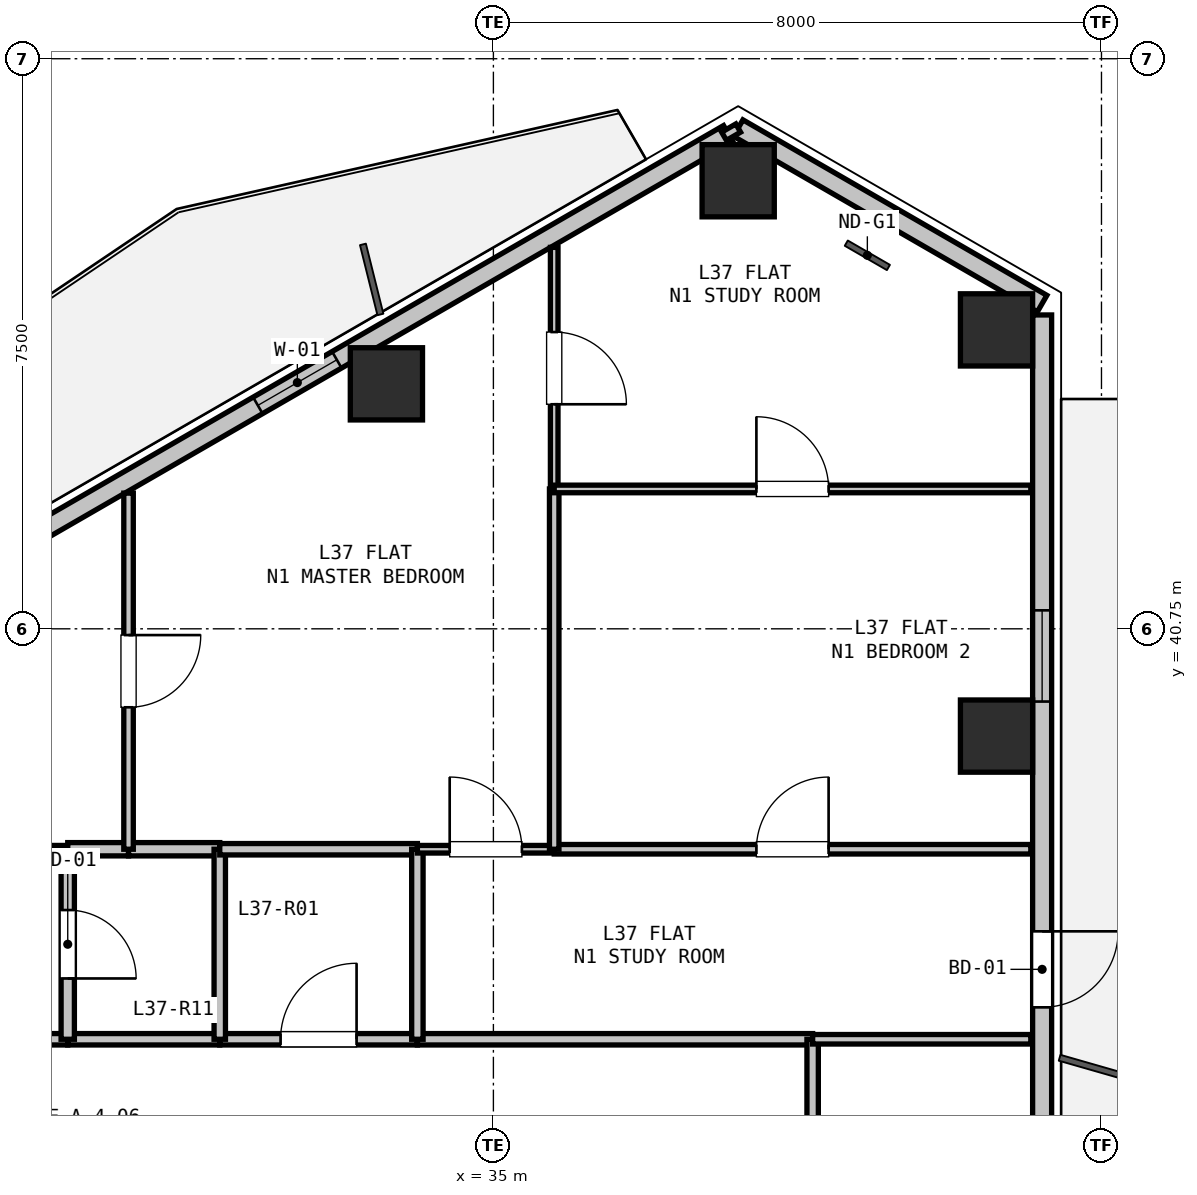
"""IFC4 building model, lengths in metres.
Left out: names, types, materials, properties, quantities, classifications, styles, units other than length and angle.
Written with IfcOpenShell. Run it as: python <this file> out.ifc"""

import sys

from ifc_helpers import new_model, si_unit, direction, frame, frame_2d, origin, origin_2d, place, context, subcontext, project, spatial, rectangle, hollow_rectangle, extrude, element, fill, save


model = new_model("IFC4")
c1 = context("Model", 3, precision=1e-05, world=origin(), true_north=direction((0.0, 1.0)))
c2 = subcontext(c1, "Body", "Model", "MODEL_VIEW")
j1 = project(units=[si_unit("LENGTHUNIT", "METRE"), si_unit("PLANEANGLEUNIT", "RADIAN")], contexts=[c1])
p1 = place(None, origin())
s1 = spatial("IfcSite", under=j1, at=p1, CompositionType="ELEMENT")
p2 = place(p1, origin())
s2 = spatial("IfcBuilding", under=s1, at=p2, CompositionType="ELEMENT")
p3 = place(p2, frame((0.0, 0.0, 134.4)))
s3 = spatial("IfcBuildingStorey", under=s2, at=p3, CompositionType="ELEMENT", Elevation=134.4)
for number, where, z_axis, x_axis in (
    (1, (33.593, 43.973, 0.0), (0.0, 0.0, 1.0), (1.0, 0.0, 0.0)),
    (2, (38.22, 46.645, 0.0), (0.0, 0.0, 1.0), (1.0, 0.0, 0.0)),
    (3, (41.619, 44.683, 0.0), (0.0, 0.0, 1.0), (1.0, 0.0, 0.0)),
    (4, (41.619, 39.339, 0.0), (0.0, 0.0, 1.0), (1.0, 0.0, 0.0)),
):
    element("IfcColumn", number, at=place(p3, frame(where, z_axis=z_axis, x_axis=x_axis)), inside=s3, PredefinedType="COLUMN", context=c2, shape_type="SweptSolid", body=[
        extrude(hollow_rectangle(XDim=0.95, YDim=0.95, WallThickness=0.028, at=origin_2d()), origin(), (0.0, 0.0, 1.0), 3.3),
    ])
p4 = place(p3, frame((38.22, 47.338, 0.0), z_axis=(0.0, 0.0, 1.0), x_axis=(0.866035021055, -0.499983342029, 0.0)))
e5 = element("IfcWall", 5, at=p4, inside=s3, PredefinedType="SOLIDWALL", context=c2, shape_type="SweptSolid", body=[
    extrude(rectangle(XDim=4.617, YDim=0.25, at=frame_2d((2.309, 0.0))), origin(), (0.0, 0.0, 1.0), 2.68),
])
p5 = place(p3, frame((28.403, 41.67, 0.0), z_axis=(0.0, 0.0, 1.0), x_axis=(0.86602239209, 0.500005216371, 0.0)))
e6 = element("IfcWall", 6, at=p5, inside=s3, PredefinedType="SOLIDWALL", context=c2, shape_type="SweptSolid", body=[
    extrude(rectangle(XDim=11.186, YDim=0.25, at=frame_2d((5.593, 0.0))), origin(), (0.0, 0.0, 1.0), 2.68),
])
p6 = place(p5, frame((4.039, 0.0, 0.9)))
e7 = element("IfcOpeningElement", 7, at=p6, cuts=e6, PredefinedType="OPENING", context=c2, shape_type="SweptSolid", body=[
    extrude(rectangle(XDim=1.2, YDim=1.4, at=frame_2d((0.6, 0.7))), frame((0.0, 0.135, 0.0), z_axis=(0.0, -1.0, 0.0), x_axis=(1.0, 0.0, 0.0)), (0.0, 0.0, 1.0), 0.27),
])
p7 = place(p3, frame((42.219, 44.879, 0.0), z_axis=(0.0, 0.0, 1.0), x_axis=(0.0, -1.0, 0.0)))
e8 = element("IfcWall", 8, at=p7, inside=s3, PredefinedType="SOLIDWALL", context=c2, shape_type="SweptSolid", body=[
    extrude(rectangle(XDim=11.186, YDim=0.25, at=frame_2d((5.593, 0.0))), origin(), (0.0, 0.0, 1.0), 2.68),
])
p8 = place(p7, frame((8.109, 0.0, 0.0)))
e9 = element("IfcOpeningElement", 9, at=p8, cuts=e8, PredefinedType="OPENING", context=c2, shape_type="SweptSolid", body=[
    extrude(rectangle(XDim=1.0, YDim=2.1, at=frame_2d((0.5, 1.05))), frame((0.0, 0.135, 0.0), z_axis=(0.0, -1.0, 0.0), x_axis=(1.0, 0.0, 0.0)), (0.0, 0.0, 1.0), 0.27),
])
p9 = place(p7, frame((3.886, 0.0, 0.9)))
e10 = element("IfcOpeningElement", 10, at=p9, cuts=e8, PredefinedType="OPENING", context=c2, shape_type="SweptSolid", body=[
    extrude(rectangle(XDim=1.2, YDim=1.4, at=frame_2d((0.6, 0.7))), frame((0.0, 0.135, 0.0), z_axis=(0.0, -1.0, 0.0), x_axis=(1.0, 0.0, 0.0)), (0.0, 0.0, 1.0), 0.27),
])
p10 = place(p3, frame((26.8, 35.35, 0.0), z_axis=(0.0, 0.0, 1.0), x_axis=(1.0, 0.0, 0.0)))
e11 = element("IfcWall", 11, at=p10, inside=s3, PredefinedType="PARTITIONING", context=c2, shape_type="SweptSolid", body=[
    extrude(rectangle(XDim=2.6, YDim=0.15, at=frame_2d((1.3, 0.0))), origin(), (0.0, 0.0, 1.0), 3.06),
])
p11 = place(p10, frame((0.8, 0.0, 0.0)))
e12 = element("IfcOpeningElement", 12, at=p11, cuts=e11, PredefinedType="OPENING", context=c2, shape_type="SweptSolid", body=[
    extrude(rectangle(XDim=1.0, YDim=2.15, at=frame_2d((0.5, 1.075))), frame((0.0, 0.085, 0.0), z_axis=(0.0, -1.0, 0.0), x_axis=(1.0, 0.0, 0.0)), (0.0, 0.0, 1.0), 0.17),
])
p12 = place(p3, frame((29.4, 35.35, 0.0), z_axis=(0.0, 0.0, 1.0), x_axis=(1.0, 0.0, 0.0)))
e13 = element("IfcWall", 13, at=p12, inside=s3, PredefinedType="PARTITIONING", context=c2, shape_type="SweptSolid", body=[
    extrude(rectangle(XDim=2.0, YDim=0.15, at=frame_2d((1.0, 0.0))), origin(), (0.0, 0.0, 1.0), 3.06),
])
p13 = place(p3, frame((31.4, 35.35, 0.0), z_axis=(0.0, 0.0, 1.0), x_axis=(1.0, 0.0, 0.0)))
e14 = element("IfcWall", 14, at=p13, inside=s3, PredefinedType="PARTITIONING", context=c2, shape_type="SweptSolid", body=[
    extrude(rectangle(XDim=2.6, YDim=0.15, at=frame_2d((1.3, 0.0))), origin(), (0.0, 0.0, 1.0), 3.06),
])
p14 = place(p13, frame((0.8, 0.0, 0.0)))
e15 = element("IfcOpeningElement", 15, at=p14, cuts=e14, PredefinedType="OPENING", context=c2, shape_type="SweptSolid", body=[
    extrude(rectangle(XDim=1.0, YDim=2.15, at=frame_2d((0.5, 1.075))), frame((0.0, 0.085, 0.0), z_axis=(0.0, -1.0, 0.0), x_axis=(1.0, 0.0, 0.0)), (0.0, 0.0, 1.0), 0.17),
])
p15 = place(p3, frame((34.0, 35.35, 0.0), z_axis=(0.0, 0.0, 1.0), x_axis=(1.0, 0.0, 0.0)))
e16 = element("IfcWall", 16, at=p15, inside=s3, PredefinedType="PARTITIONING", context=c2, shape_type="SweptSolid", body=[
    extrude(rectangle(XDim=5.2, YDim=0.15, at=frame_2d((2.6, 0.0))), origin(), (0.0, 0.0, 1.0), 2.433),
])
p16 = place(p3, frame((39.2, 35.35, 0.0), z_axis=(0.0, 0.0, 1.0), x_axis=(0.0, -1.0, 0.0)))
e17 = element("IfcWall", 17, at=p16, inside=s3, PredefinedType="PARTITIONING", context=c2, shape_type="SweptSolid", body=[
    extrude(rectangle(XDim=1.75, YDim=0.15, at=frame_2d((0.875, 0.0))), origin(), (0.0, 0.0, 1.0), 3.06),
])
p17 = place(p3, frame((26.8, 37.85, 0.0), z_axis=(0.0, 0.0, 1.0), x_axis=(1.0, 0.0, 0.0)))
e18 = element("IfcWall", 18, at=p17, inside=s3, PredefinedType="PARTITIONING", context=c2, shape_type="SweptSolid", body=[
    extrude(rectangle(XDim=2.6, YDim=0.1, at=frame_2d((1.3, 0.0))), origin(), (0.0, 0.0, 1.0), 3.06),
])
p18 = place(p17, frame((0.825, 0.0, 0.0)))
e19 = element("IfcOpeningElement", 19, at=p18, cuts=e18, PredefinedType="OPENING", context=c2, shape_type="SweptSolid", body=[
    extrude(rectangle(XDim=0.95, YDim=2.1, at=frame_2d((0.475, 1.05))), frame((0.0, 0.06, 0.0), z_axis=(0.0, -1.0, 0.0), x_axis=(1.0, 0.0, 0.0)), (0.0, 0.0, 1.0), 0.12),
])
p19 = place(p3, frame((29.4, 37.85, 0.0), z_axis=(0.0, 0.0, 1.0), x_axis=(0.0, -1.0, 0.0)))
e20 = element("IfcWall", 20, at=p19, inside=s3, PredefinedType="PLUMBINGWALL", context=c2, shape_type="SweptSolid", body=[
    extrude(rectangle(XDim=2.5, YDim=0.175, at=frame_2d((1.25, 0.0))), origin(), (0.0, 0.0, 1.0), 3.06),
])
p20 = place(p19, frame((0.8, 0.0, 0.0)))
e21 = element("IfcOpeningElement", 21, at=p20, cuts=e20, PredefinedType="OPENING", context=c2, shape_type="SweptSolid", body=[
    extrude(rectangle(XDim=0.9, YDim=2.1, at=frame_2d((0.45, 1.05))), frame((0.0, 0.097, 0.0), z_axis=(0.0, -1.0, 0.0), x_axis=(1.0, 0.0, 0.0)), (0.0, 0.0, 1.0), 0.195),
])
p21 = place(p3, frame((29.4, 37.85, 0.0), z_axis=(0.0, 0.0, 1.0), x_axis=(1.0, 0.0, 0.0)))
e22 = element("IfcWall", 22, at=p21, inside=s3, PredefinedType="PLUMBINGWALL", context=c2, shape_type="SweptSolid", body=[
    extrude(rectangle(XDim=0.8, YDim=0.175, at=frame_2d((0.4, 0.0))), origin(), (0.0, 0.0, 1.0), 3.06),
])
p22 = place(p3, frame((30.2, 37.85, 0.0), z_axis=(0.0, 0.0, 1.0), x_axis=(1.0, 0.0, 0.0)))
e23 = element("IfcWall", 23, at=p22, inside=s3, PredefinedType="PLUMBINGWALL", context=c2, shape_type="SweptSolid", body=[
    extrude(rectangle(XDim=1.2, YDim=0.175, at=frame_2d((0.6, 0.0))), origin(), (0.0, 0.0, 1.0), 3.06),
])
p23 = place(p3, frame((31.4, 37.85, 0.0), z_axis=(0.0, 0.0, 1.0), x_axis=(0.0, -1.0, 0.0)))
e24 = element("IfcWall", 24, at=p23, inside=s3, PredefinedType="PARTITIONING", context=c2, shape_type="SweptSolid", body=[
    extrude(rectangle(XDim=2.5, YDim=0.15, at=frame_2d((1.25, 0.0))), origin(), (0.0, 0.0, 1.0), 3.06),
])
p24 = place(p3, frame((31.4, 37.85, 0.0), z_axis=(0.0, 0.0, 1.0), x_axis=(1.0, 0.0, 0.0)))
e25 = element("IfcWall", 25, at=p24, inside=s3, PredefinedType="PARTITIONING", context=c2, shape_type="SweptSolid", body=[
    extrude(rectangle(XDim=2.6, YDim=0.15, at=frame_2d((1.3, 0.0))), origin(), (0.0, 0.0, 1.0), 3.06),
])
p25 = place(p3, frame((34.0, 37.85, 0.0), z_axis=(0.0, 0.0, 1.0), x_axis=(0.0, -1.0, 0.0)))
e26 = element("IfcWall", 26, at=p25, inside=s3, PredefinedType="PARTITIONING", context=c2, shape_type="SweptSolid", body=[
    extrude(rectangle(XDim=2.5, YDim=0.15, at=frame_2d((1.25, 0.0))), origin(), (0.0, 0.0, 1.0), 3.06),
])
p26 = place(p3, frame((42.07, 35.35, 0.0), z_axis=(0.0, 0.0, 1.0), x_axis=(-1.0, 0.0, 0.0)))
e27 = element("IfcWall", 27, at=p26, inside=s3, PredefinedType="PARTITIONING", context=c2, shape_type="SweptSolid", body=[
    extrude(rectangle(XDim=2.87, YDim=0.125, at=frame_2d((1.435, 0.0))), origin(), (0.0, 0.0, 1.0), 2.365),
])
p27 = place(p3, frame((34.0, 37.85, 0.0), z_axis=(0.0, 0.0, 1.0), x_axis=(1.0, 0.0, 0.0)))
e28 = element("IfcWall", 28, at=p27, inside=s3, PredefinedType="PARTITIONING", context=c2, shape_type="SweptSolid", body=[
    extrude(rectangle(XDim=1.8, YDim=0.1, at=frame_2d((0.9, 0.0))), origin(), (0.0, 0.0, 1.0), 3.06),
])
p28 = place(p27, frame((0.425, 0.0, 0.0)))
e29 = element("IfcOpeningElement", 29, at=p28, cuts=e28, PredefinedType="OPENING", context=c2, shape_type="SweptSolid", body=[
    extrude(rectangle(XDim=0.95, YDim=2.1, at=frame_2d((0.475, 1.05))), frame((0.0, 0.06, 0.0), z_axis=(0.0, -1.0, 0.0), x_axis=(1.0, 0.0, 0.0)), (0.0, 0.0, 1.0), 0.12),
])
p29 = place(p3, frame((35.8, 37.85, 0.0), z_axis=(0.0, 0.0, 1.0), x_axis=(1.0, 0.0, 0.0)))
e30 = element("IfcWall", 30, at=p29, inside=s3, PredefinedType="PARTITIONING", context=c2, shape_type="SweptSolid", body=[
    extrude(rectangle(XDim=6.27, YDim=0.125, at=frame_2d((3.135, 0.0))), origin(), (0.0, 0.0, 1.0), 2.365),
])
p30 = place(p29, frame((2.66, 0.0, 0.0)))
e31 = element("IfcOpeningElement", 31, at=p30, cuts=e30, PredefinedType="OPENING", context=c2, shape_type="SweptSolid", body=[
    extrude(rectangle(XDim=0.95, YDim=2.1, at=frame_2d((0.475, 1.05))), frame((0.0, 0.073, 0.0), z_axis=(0.0, -1.0, 0.0), x_axis=(1.0, 0.0, 0.0)), (0.0, 0.0, 1.0), 0.145),
])
p31 = place(p3, frame((30.2, 42.535, 0.0), z_axis=(0.0, 0.0, 1.0), x_axis=(0.0, -1.0, 0.0)))
e32 = element("IfcWall", 32, at=p31, inside=s3, PredefinedType="PARTITIONING", context=c2, shape_type="SweptSolid", body=[
    extrude(rectangle(XDim=4.685, YDim=0.125, at=frame_2d((2.342, 0.0))), origin(), (0.0, 0.0, 1.0), 2.365),
])
p32 = place(p31, frame((1.867, 0.0, 0.0)))
e33 = element("IfcOpeningElement", 33, at=p32, cuts=e32, PredefinedType="OPENING", context=c2, shape_type="SweptSolid", body=[
    extrude(rectangle(XDim=0.95, YDim=2.1, at=frame_2d((0.475, 1.05))), frame((0.0, 0.073, 0.0), z_axis=(0.0, -1.0, 0.0), x_axis=(1.0, 0.0, 0.0)), (0.0, 0.0, 1.0), 0.145),
])
p33 = place(p3, frame((35.8, 45.768, 0.0), z_axis=(0.0, 0.0, 1.0), x_axis=(0.0, -1.0, 0.0)))
e34 = element("IfcWall", 34, at=p33, inside=s3, PredefinedType="PARTITIONING", context=c2, shape_type="SweptSolid", body=[
    extrude(rectangle(XDim=3.178, YDim=0.1, at=frame_2d((1.589, 0.0))), origin(), (0.0, 0.0, 1.0), 2.725),
])
p34 = place(p33, frame((1.114, 0.0, 0.0)))
e35 = element("IfcOpeningElement", 35, at=p34, cuts=e34, PredefinedType="OPENING", context=c2, shape_type="SweptSolid", body=[
    extrude(rectangle(XDim=0.95, YDim=2.1, at=frame_2d((0.475, 1.05))), frame((0.0, 0.06, 0.0), z_axis=(0.0, -1.0, 0.0), x_axis=(1.0, 0.0, 0.0)), (0.0, 0.0, 1.0), 0.12),
])
p35 = place(p3, frame((35.8, 42.59, 0.0), z_axis=(0.0, 0.0, 1.0), x_axis=(0.0, -1.0, 0.0)))
e36 = element("IfcWall", 36, at=p35, inside=s3, PredefinedType="PARTITIONING", context=c2, shape_type="SweptSolid", body=[
    extrude(rectangle(XDim=4.74, YDim=0.125, at=frame_2d((2.37, 0.0))), origin(), (0.0, 0.0, 1.0), 3.06),
])
p36 = place(p3, frame((35.8, 42.59, 0.0), z_axis=(0.0, 0.0, 1.0), x_axis=(1.0, 0.0, 0.0)))
e37 = element("IfcWall", 37, at=p36, inside=s3, PredefinedType="PARTITIONING", context=c2, shape_type="SweptSolid", body=[
    extrude(rectangle(XDim=6.27, YDim=0.1, at=frame_2d((3.135, 0.0))), origin(), (0.0, 0.0, 1.0), 2.433),
])
p37 = place(p36, frame((2.66, 0.0, 0.0)))
e38 = element("IfcOpeningElement", 38, at=p37, cuts=e37, PredefinedType="OPENING", context=c2, shape_type="SweptSolid", body=[
    extrude(rectangle(XDim=0.95, YDim=2.1, at=frame_2d((0.475, 1.05))), frame((0.0, 0.06, 0.0), z_axis=(0.0, -1.0, 0.0), x_axis=(1.0, 0.0, 0.0)), (0.0, 0.0, 1.0), 0.12),
])
p38 = place(p3, frame((38.034, 47.23, 0.0), z_axis=(0.0, 0.0, 1.0), x_axis=(0.865581379588, 0.500768285049, 0.0)))
e39 = element("IfcWall", 39, at=p38, inside=s3, PredefinedType="PARTITIONING", context=c2, shape_type="SweptSolid", body=[
    extrude(rectangle(XDim=0.216, YDim=0.125, at=frame_2d((0.108, 0.0))), origin(), (0.0, 0.0, 1.0), 3.06),
])
p39 = place(p6, origin())
e40 = element("IfcWindow", 40, at=p39, inside=s3, PartitioningType="SINGLE_PANEL", PredefinedType="WINDOW", context=c2, shape_type="SweptSolid", body=[
    extrude(rectangle(XDim=1.2, YDim=1.4, at=frame_2d((0.6, 0.7))), frame((0.0, 0.03, 0.0), z_axis=(0.0, -1.0, 0.0), x_axis=(1.0, 0.0, 0.0)), (0.0, 0.0, 1.0), 0.06),
])
fill(e7, e40)
p40 = place(p8, origin())
e41 = element("IfcDoor", 41, at=p40, inside=s3, OperationType="SINGLE_SWING_LEFT", PredefinedType="DOOR", context=c2, shape_type="SweptSolid", body=[
    extrude(rectangle(XDim=1.0, YDim=2.1, at=frame_2d((0.5, 1.05))), frame((0.0, 0.025, 0.0), z_axis=(0.0, -1.0, 0.0), x_axis=(1.0, 0.0, 0.0)), (0.0, 0.0, 1.0), 0.05),
])
fill(e9, e41)
p41 = place(p9, origin())
e42 = element("IfcWindow", 42, at=p41, inside=s3, PartitioningType="SINGLE_PANEL", PredefinedType="WINDOW", context=c2, shape_type="SweptSolid", body=[
    extrude(rectangle(XDim=1.2, YDim=1.4, at=frame_2d((0.6, 0.7))), frame((0.0, 0.03, 0.0), z_axis=(0.0, -1.0, 0.0), x_axis=(1.0, 0.0, 0.0)), (0.0, 0.0, 1.0), 0.06),
])
fill(e10, e42)
p42 = place(p14, origin())
e43 = element("IfcDoor", 43, at=p42, inside=s3, OperationType="SINGLE_SWING_RIGHT", PredefinedType="DOOR", context=c2, shape_type="SweptSolid", body=[
    extrude(rectangle(XDim=1.0, YDim=2.15, at=frame_2d((0.5, 1.075))), frame((0.0, 0.025, 0.0), z_axis=(0.0, -1.0, 0.0), x_axis=(1.0, 0.0, 0.0)), (0.0, 0.0, 1.0), 0.05),
])
fill(e15, e43)
p43 = place(p20, origin())
e44 = element("IfcDoor", 44, at=p43, inside=s3, OperationType="SINGLE_SWING_RIGHT", PredefinedType="DOOR", context=c2, shape_type="SweptSolid", body=[
    extrude(rectangle(XDim=0.9, YDim=2.1, at=frame_2d((0.45, 1.05))), frame((0.0, 0.025, 0.0), z_axis=(0.0, -1.0, 0.0), x_axis=(1.0, 0.0, 0.0)), (0.0, 0.0, 1.0), 0.05),
])
fill(e21, e44)
p44 = place(p28, origin())
e45 = element("IfcDoor", 45, at=p44, inside=s3, OperationType="SINGLE_SWING_LEFT", PredefinedType="DOOR", context=c2, shape_type="SweptSolid", body=[
    extrude(rectangle(XDim=0.95, YDim=2.1, at=frame_2d((0.475, 1.05))), frame((0.0, 0.025, 0.0), z_axis=(0.0, -1.0, 0.0), x_axis=(1.0, 0.0, 0.0)), (0.0, 0.0, 1.0), 0.05),
])
fill(e29, e45)
p45 = place(p30, origin())
e46 = element("IfcDoor", 46, at=p45, inside=s3, OperationType="SINGLE_SWING_RIGHT", PredefinedType="DOOR", context=c2, shape_type="SweptSolid", body=[
    extrude(rectangle(XDim=0.95, YDim=2.1, at=frame_2d((0.475, 1.05))), frame((0.0, 0.025, 0.0), z_axis=(0.0, -1.0, 0.0), x_axis=(1.0, 0.0, 0.0)), (0.0, 0.0, 1.0), 0.05),
])
fill(e31, e46)
p46 = place(p32, origin())
e47 = element("IfcDoor", 47, at=p46, inside=s3, OperationType="SINGLE_SWING_LEFT", PredefinedType="DOOR", context=c2, shape_type="SweptSolid", body=[
    extrude(rectangle(XDim=0.95, YDim=2.1, at=frame_2d((0.475, 1.05))), frame((0.0, 0.025, 0.0), z_axis=(0.0, -1.0, 0.0), x_axis=(1.0, 0.0, 0.0)), (0.0, 0.0, 1.0), 0.05),
])
fill(e33, e47)
p47 = place(p34, origin())
e48 = element("IfcDoor", 48, at=p47, inside=s3, OperationType="SINGLE_SWING_RIGHT", PredefinedType="DOOR", context=c2, shape_type="SweptSolid", body=[
    extrude(rectangle(XDim=0.95, YDim=2.1, at=frame_2d((0.475, 1.05))), frame((0.0, 0.025, 0.0), z_axis=(0.0, -1.0, 0.0), x_axis=(1.0, 0.0, 0.0)), (0.0, 0.0, 1.0), 0.05),
])
fill(e35, e48)
p48 = place(p37, origin())
e49 = element("IfcDoor", 49, at=p48, inside=s3, OperationType="SINGLE_SWING_LEFT", PredefinedType="DOOR", context=c2, shape_type="SweptSolid", body=[
    extrude(rectangle(XDim=0.95, YDim=2.1, at=frame_2d((0.475, 1.05))), frame((0.0, 0.025, 0.0), z_axis=(0.0, -1.0, 0.0), x_axis=(1.0, 0.0, 0.0)), (0.0, 0.0, 1.0), 0.05),
])
fill(e38, e49)
save(model, sys.argv[1])
